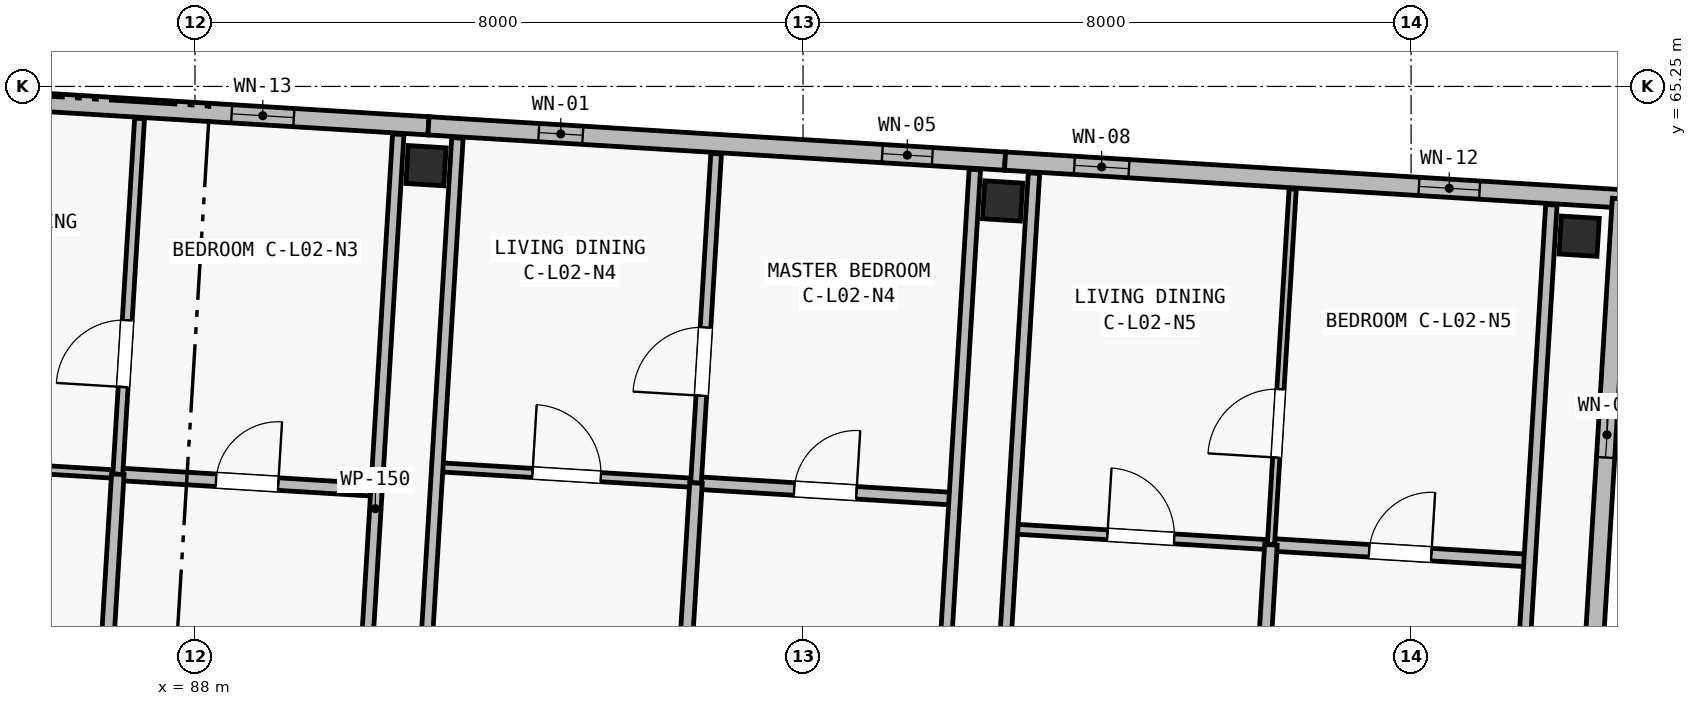
"""IFC4 building model, lengths in metres.
Left out: names, types, materials, properties, quantities, classifications, styles, units other than length and angle.
Written with IfcOpenShell. Run it as: python <this file> out.ifc"""

import sys

from ifc_helpers import new_model, si_unit, direction, frame, frame_2d, origin, origin_2d, place, context, subcontext, project, spatial, rectangle, extrude, element, fill, save


model = new_model("IFC4")
c1 = context("Model", 3, precision=1e-05, world=origin(), true_north=direction((0.0, 1.0)))
c2 = subcontext(c1, "Body", "Model", "MODEL_VIEW")
j1 = project(units=[si_unit("LENGTHUNIT", "METRE"), si_unit("PLANEANGLEUNIT", "RADIAN")], contexts=[c1])
p1 = place(None, origin())
s1 = spatial("IfcSite", under=j1, at=p1, CompositionType="ELEMENT")
p2 = place(p1, origin())
s2 = spatial("IfcBuilding", under=s1, at=p2, CompositionType="ELEMENT")
p3 = place(p2, frame((0.0, 0.0, 8.4)))
s3 = spatial("IfcBuildingStorey", under=s2, at=p3, CompositionType="ELEMENT", Elevation=8.4)
for number, where, z_axis, x_axis in (
    (1, (91.04, 64.208, 0.0), (0.0, 0.0, 1.0), (0.998, -0.061, 0.0)),
    (2, (98.626, 63.744, 0.0), (0.0, 0.0, 1.0), (0.998, -0.061, 0.0)),
    (3, (106.211, 63.28, 0.0), (0.0, 0.0, 1.0), (0.998, -0.061, 0.0)),
):
    element("IfcColumn", number, at=place(p3, frame(where, z_axis=z_axis, x_axis=x_axis)), inside=s3, PredefinedType="COLUMN", context=c2, shape_type="SweptSolid", body=[
        extrude(rectangle(XDim=0.5, YDim=0.5, at=origin_2d()), origin(), (0.0, 0.0, 1.0), 3.25),
    ])
p4 = place(p3, frame((83.486, 65.196, 0.0), z_axis=(0.0, 0.0, 1.0), x_axis=(0.998135669243, -0.061034300063, 0.0)))
e4 = element("IfcWall", 4, at=p4, inside=s3, PredefinedType="SOLIDWALL", context=c2, shape_type="SweptSolid", body=[
    extrude(rectangle(XDim=7.6, YDim=0.24, at=frame_2d((3.8, 0.0))), origin(), (0.0, 0.0, 1.0), 3.0),
])
p5 = place(p4, frame((1.807, 0.0, 0.5)))
e5 = element("IfcOpeningElement", 5, at=p5, cuts=e4, PredefinedType="OPENING", context=c2, shape_type="SweptSolid", body=[
    extrude(rectangle(XDim=0.74, YDim=2.26, at=frame_2d((0.37, 1.13))), frame((0.0, 0.135, 0.0), z_axis=(0.0, -1.0, 0.0), x_axis=(1.0, 0.0, 0.0)), (0.0, 0.0, 1.0), 0.27),
])
p6 = place(p4, frame((5.006, 0.0, 0.44)))
e6 = element("IfcOpeningElement", 6, at=p6, cuts=e4, PredefinedType="OPENING", context=c2, shape_type="SweptSolid", body=[
    extrude(rectangle(XDim=0.82, YDim=2.18, at=frame_2d((0.41, 1.09))), frame((0.0, 0.135, 0.0), z_axis=(0.0, -1.0, 0.0), x_axis=(1.0, 0.0, 0.0)), (0.0, 0.0, 1.0), 0.27),
])
p7 = place(p3, frame((91.072, 64.732, 0.0), z_axis=(0.0, 0.0, 1.0), x_axis=(0.998133591969, -0.061068261669, 0.0)))
e7 = element("IfcWall", 7, at=p7, inside=s3, PredefinedType="SOLIDWALL", context=c2, shape_type="SweptSolid", body=[
    extrude(rectangle(XDim=7.6, YDim=0.24, at=frame_2d((3.8, 0.0))), origin(), (0.0, 0.0, 1.0), 3.0),
])
p8 = place(p7, frame((1.454, 0.0, 0.44)))
e8 = element("IfcOpeningElement", 8, at=p8, cuts=e7, PredefinedType="OPENING", context=c2, shape_type="SweptSolid", body=[
    extrude(rectangle(XDim=0.58, YDim=2.16, at=frame_2d((0.29, 1.08))), frame((0.0, 0.135, 0.0), z_axis=(0.0, -1.0, 0.0), x_axis=(1.0, 0.0, 0.0)), (0.0, 0.0, 1.0), 0.27),
])
p9 = place(p7, frame((5.982, 0.0, 0.5)))
e9 = element("IfcOpeningElement", 9, at=p9, cuts=e7, PredefinedType="OPENING", context=c2, shape_type="SweptSolid", body=[
    extrude(rectangle(XDim=0.66, YDim=2.32, at=frame_2d((0.33, 1.16))), frame((0.0, 0.135, 0.0), z_axis=(0.0, -1.0, 0.0), x_axis=(1.0, 0.0, 0.0)), (0.0, 0.0, 1.0), 0.27),
])
p10 = place(p3, frame((98.658, 64.268, 0.0), z_axis=(0.0, 0.0, 1.0), x_axis=(0.998134248939, -0.061057522844, 0.0)))
e10 = element("IfcWall", 10, at=p10, inside=s3, PredefinedType="SOLIDWALL", context=c2, shape_type="SweptSolid", body=[
    extrude(rectangle(XDim=8.125, YDim=0.24, at=frame_2d((4.062, 0.0))), origin(), (0.0, 0.0, 1.0), 3.0),
])
p11 = place(p10, frame((0.914, 0.0, 0.5)))
e11 = element("IfcOpeningElement", 11, at=p11, cuts=e10, PredefinedType="OPENING", context=c2, shape_type="SweptSolid", body=[
    extrude(rectangle(XDim=0.72, YDim=2.16, at=frame_2d((0.36, 1.08))), frame((0.0, 0.135, 0.0), z_axis=(0.0, -1.0, 0.0), x_axis=(1.0, 0.0, 0.0)), (0.0, 0.0, 1.0), 0.27),
])
p12 = place(p10, frame((5.456, 0.0, 0.44)))
e12 = element("IfcOpeningElement", 12, at=p12, cuts=e10, PredefinedType="OPENING", context=c2, shape_type="SweptSolid", body=[
    extrude(rectangle(XDim=0.8, YDim=2.3, at=frame_2d((0.4, 1.15))), frame((0.0, 0.135, 0.0), z_axis=(0.0, -1.0, 0.0), x_axis=(1.0, 0.0, 0.0)), (0.0, 0.0, 1.0), 0.27),
])
p13 = place(p3, frame((106.768, 63.771, 0.0), z_axis=(0.0, 0.0, 1.0), x_axis=(-0.061053332998, -0.99813450523, 0.0)))
e13 = element("IfcWall", 13, at=p13, inside=s3, PredefinedType="SOLIDWALL", context=c2, shape_type="SweptSolid", body=[
    extrude(rectangle(XDim=20.65, YDim=0.24, at=frame_2d((10.325, 0.0))), origin(), (0.0, 0.0, 1.0), 3.0),
])
p14 = place(p13, frame((2.81, 0.0, 0.45)))
e14 = element("IfcOpeningElement", 14, at=p14, cuts=e13, PredefinedType="OPENING", context=c2, shape_type="SweptSolid", body=[
    extrude(rectangle(XDim=0.6, YDim=2.22, at=frame_2d((0.3, 1.11))), frame((0.0, 0.135, 0.0), z_axis=(0.0, -1.0, 0.0), x_axis=(1.0, 0.0, 0.0)), (0.0, 0.0, 1.0), 0.27),
])
p15 = place(p13, frame((17.1, 0.0, 0.52)))
e15 = element("IfcOpeningElement", 15, at=p15, cuts=e13, PredefinedType="OPENING", context=c2, shape_type="SweptSolid", body=[
    extrude(rectangle(XDim=0.74, YDim=2.26, at=frame_2d((0.37, 1.13))), frame((0.0, 0.135, 0.0), z_axis=(0.0, -1.0, 0.0), x_axis=(1.0, 0.0, 0.0)), (0.0, 0.0, 1.0), 0.27),
])
p16 = place(p3, frame((83.581, 60.356, 0.0), z_axis=(0.0, 0.0, 1.0), x_axis=(0.998133350094, -0.061072214879, 0.0)))
e16 = element("IfcWall", 16, at=p16, inside=s3, PredefinedType="PARTITIONING", context=c2, shape_type="SweptSolid", body=[
    extrude(rectangle(XDim=3.41, YDim=0.11, at=frame_2d((1.705, 0.0))), origin(), (0.0, 0.0, 1.0), 2.97),
])
p17 = place(p16, frame((1.255, 0.0, 0.0)))
e17 = element("IfcOpeningElement", 17, at=p17, cuts=e16, PredefinedType="OPENING", context=c2, shape_type="SweptSolid", body=[
    extrude(rectangle(XDim=0.9, YDim=2.1, at=frame_2d((0.45, 1.05))), frame((0.0, 0.07, 0.0), z_axis=(0.0, -1.0, 0.0), x_axis=(1.0, 0.0, 0.0)), (0.0, 0.0, 1.0), 0.14),
])
p18 = place(p3, frame((86.984, 60.147, 0.0), z_axis=(0.0, 0.0, 1.0), x_axis=(0.99813797838, -0.060996525433, 0.0)))
e18 = element("IfcWall", 18, at=p18, inside=s3, PredefinedType="PLUMBINGWALL", context=c2, shape_type="SweptSolid", body=[
    extrude(rectangle(XDim=3.41, YDim=0.165, at=frame_2d((1.705, 0.0))), origin(), (0.0, 0.0, 1.0), 2.97),
])
p19 = place(p18, frame((1.295, 0.0, 0.0)))
e19 = element("IfcOpeningElement", 19, at=p19, cuts=e18, PredefinedType="OPENING", context=c2, shape_type="SweptSolid", body=[
    extrude(rectangle(XDim=0.82, YDim=2.08, at=frame_2d((0.41, 1.04))), frame((0.0, 0.097, 0.0), z_axis=(0.0, -1.0, 0.0), x_axis=(1.0, 0.0, 0.0)), (0.0, 0.0, 1.0), 0.195),
])
p20 = place(p3, frame((86.984, 60.147, 0.0), z_axis=(0.0, 0.0, 1.0), x_axis=(0.061059262019, 0.998134142549, 0.0)))
e20 = element("IfcWall", 20, at=p20, inside=s3, PredefinedType="PARTITIONING", context=c2, shape_type="SweptSolid", body=[
    extrude(rectangle(XDim=4.69, YDim=0.13, at=frame_2d((2.345, 0.0))), origin(), (0.0, 0.0, 1.0), 2.97),
])
p21 = place(p20, frame((1.15, 0.0, 0.0)))
e21 = element("IfcOpeningElement", 21, at=p21, cuts=e20, PredefinedType="OPENING", context=c2, shape_type="SweptSolid", body=[
    extrude(rectangle(XDim=0.88, YDim=2.1, at=frame_2d((0.44, 1.05))), frame((0.0, 0.08, 0.0), z_axis=(0.0, -1.0, 0.0), x_axis=(1.0, 0.0, 0.0)), (0.0, 0.0, 1.0), 0.16),
])
p22 = place(p3, frame((86.668, 54.977, 0.0), z_axis=(0.0, 0.0, 1.0), x_axis=(0.061037231879, 0.998135489963, 0.0)))
e22 = element("IfcWall", 22, at=p22, inside=s3, PredefinedType="PLUMBINGWALL", context=c2, shape_type="SweptSolid", body=[
    extrude(rectangle(XDim=5.18, YDim=0.165, at=frame_2d((2.59, 0.0))), origin(), (0.0, 0.0, 1.0), 2.97),
])
p23 = place(p3, frame((90.072, 54.769, 0.0), z_axis=(0.0, 0.0, 1.0), x_axis=(0.061047700465, 0.998134849741, 0.0)))
e23 = element("IfcWall", 23, at=p23, inside=s3, PredefinedType="PARTITIONING", context=c2, shape_type="SweptSolid", body=[
    extrude(rectangle(XDim=9.87, YDim=0.15, at=frame_2d((4.935, 0.0))), origin(), (0.0, 0.0, 1.0), 2.97),
])
p24 = place(p3, frame((91.188, 60.241, 0.0), z_axis=(0.0, 0.0, 1.0), x_axis=(0.998133350094, -0.061072214879, 0.0)))
e24 = element("IfcWall", 24, at=p24, inside=s3, PredefinedType="PARTITIONING", context=c2, shape_type="SweptSolid", body=[
    extrude(rectangle(XDim=3.41, YDim=0.12, at=frame_2d((1.705, 0.0))), origin(), (0.0, 0.0, 1.0), 2.97),
])
p25 = place(p24, frame((1.255, 0.0, 0.0)))
e25 = element("IfcOpeningElement", 25, at=p25, cuts=e24, PredefinedType="OPENING", context=c2, shape_type="SweptSolid", body=[
    extrude(rectangle(XDim=0.9, YDim=2.1, at=frame_2d((0.45, 1.05))), frame((0.0, 0.075, 0.0), z_axis=(0.0, -1.0, 0.0), x_axis=(1.0, 0.0, 0.0)), (0.0, 0.0, 1.0), 0.15),
])
p26 = place(p3, frame((94.592, 60.033, 0.0), z_axis=(0.0, 0.0, 1.0), x_axis=(0.998133617109, -0.061067850767, 0.0)))
e26 = element("IfcWall", 26, at=p26, inside=s3, PredefinedType="PLUMBINGWALL", context=c2, shape_type="SweptSolid", body=[
    extrude(rectangle(XDim=3.41, YDim=0.165, at=frame_2d((1.705, 0.0))), origin(), (0.0, 0.0, 1.0), 2.97),
])
p27 = place(p26, frame((1.295, 0.0, 0.0)))
e27 = element("IfcOpeningElement", 27, at=p27, cuts=e26, PredefinedType="OPENING", context=c2, shape_type="SweptSolid", body=[
    extrude(rectangle(XDim=0.82, YDim=2.08, at=frame_2d((0.41, 1.04))), frame((0.0, 0.097, 0.0), z_axis=(0.0, -1.0, 0.0), x_axis=(1.0, 0.0, 0.0)), (0.0, 0.0, 1.0), 0.195),
])
p28 = place(p3, frame((94.592, 60.033, 0.0), z_axis=(0.0, 0.0, 1.0), x_axis=(0.061092906669, 0.998132083822, 0.0)))
e28 = element("IfcWall", 28, at=p28, inside=s3, PredefinedType="PARTITIONING", context=c2, shape_type="SweptSolid", body=[
    extrude(rectangle(XDim=4.34, YDim=0.14, at=frame_2d((2.17, 0.0))), origin(), (0.0, 0.0, 1.0), 2.97),
])
p29 = place(p28, frame((1.15, 0.0, 0.0)))
e29 = element("IfcOpeningElement", 29, at=p29, cuts=e28, PredefinedType="OPENING", context=c2, shape_type="SweptSolid", body=[
    extrude(rectangle(XDim=0.9, YDim=2.1, at=frame_2d((0.45, 1.05))), frame((0.0, 0.085, 0.0), z_axis=(0.0, -1.0, 0.0), x_axis=(1.0, 0.0, 0.0)), (0.0, 0.0, 1.0), 0.17),
])
p30 = place(p3, frame((94.254, 54.513, 0.0), z_axis=(0.0, 0.0, 1.0), x_axis=(0.061056206715, 0.998134329447, 0.0)))
e30 = element("IfcWall", 30, at=p30, inside=s3, PredefinedType="PLUMBINGWALL", context=c2, shape_type="SweptSolid", body=[
    extrude(rectangle(XDim=5.53, YDim=0.165, at=frame_2d((2.765, 0.0))), origin(), (0.0, 0.0, 1.0), 2.97),
])
for number, where, z_axis, x_axis in (
    (31, (90.85, 54.721, 0.0), (0.0, 0.0, 1.0), (0.061, 0.998, 0.0)),
    (32, (97.658, 54.305, 0.0), (0.0, 0.0, 1.0), (0.061, 0.998, 0.0)),
):
    element("IfcWall", number, at=place(p3, frame(where, z_axis=z_axis, x_axis=x_axis)), inside=s3, PredefinedType="PARTITIONING", context=c2, shape_type="SweptSolid", body=[
        extrude(rectangle(XDim=9.87, YDim=0.15, at=frame_2d((4.935, 0.0))), origin(), (0.0, 0.0, 1.0), 2.97),
    ])
p31 = place(p3, frame((98.752, 59.428, 0.0), z_axis=(0.0, 0.0, 1.0), x_axis=(0.998137711988, -0.061000884486, 0.0)))
e33 = element("IfcWall", 33, at=p31, inside=s3, PredefinedType="PARTITIONING", context=c2, shape_type="SweptSolid", body=[
    extrude(rectangle(XDim=3.41, YDim=0.13, at=frame_2d((1.705, 0.0))), origin(), (0.0, 0.0, 1.0), 2.97),
])
p32 = place(p31, frame((1.255, 0.0, 0.0)))
e34 = element("IfcOpeningElement", 34, at=p32, cuts=e33, PredefinedType="OPENING", context=c2, shape_type="SweptSolid", body=[
    extrude(rectangle(XDim=0.88, YDim=2.1, at=frame_2d((0.44, 1.05))), frame((0.0, 0.08, 0.0), z_axis=(0.0, -1.0, 0.0), x_axis=(1.0, 0.0, 0.0)), (0.0, 0.0, 1.0), 0.16),
])
p33 = place(p3, frame((102.156, 59.22, 0.0), z_axis=(0.0, 0.0, 1.0), x_axis=(0.998133617109, -0.061067850767, 0.0)))
e35 = element("IfcWall", 35, at=p33, inside=s3, PredefinedType="PLUMBINGWALL", context=c2, shape_type="SweptSolid", body=[
    extrude(rectangle(XDim=3.41, YDim=0.165, at=frame_2d((1.705, 0.0))), origin(), (0.0, 0.0, 1.0), 2.97),
])
p34 = place(p33, frame((1.295, 0.0, 0.0)))
e36 = element("IfcOpeningElement", 36, at=p34, cuts=e35, PredefinedType="OPENING", context=c2, shape_type="SweptSolid", body=[
    extrude(rectangle(XDim=0.82, YDim=2.08, at=frame_2d((0.41, 1.04))), frame((0.0, 0.097, 0.0), z_axis=(0.0, -1.0, 0.0), x_axis=(1.0, 0.0, 0.0)), (0.0, 0.0, 1.0), 0.195),
])
p35 = place(p3, frame((102.156, 59.22, 0.0), z_axis=(0.0, 0.0, 1.0), x_axis=(0.061062434628, 0.998133948465, 0.0)))
e37 = element("IfcWall", 37, at=p35, inside=s3, PredefinedType="PARTITIONING", context=c2, shape_type="SweptSolid", body=[
    extrude(rectangle(XDim=4.69, YDim=0.095, at=frame_2d((2.345, 0.0))), origin(), (0.0, 0.0, 1.0), 2.97),
])
p36 = place(p35, frame((1.15, 0.0, 0.0)))
e38 = element("IfcOpeningElement", 38, at=p36, cuts=e37, PredefinedType="OPENING", context=c2, shape_type="SweptSolid", body=[
    extrude(rectangle(XDim=0.9, YDim=2.1, at=frame_2d((0.45, 1.05))), frame((0.0, 0.062, 0.0), z_axis=(0.0, -1.0, 0.0), x_axis=(1.0, 0.0, 0.0)), (0.0, 0.0, 1.0), 0.125),
])
p37 = place(p3, frame((101.84, 54.049, 0.0), z_axis=(0.0, 0.0, 1.0), x_axis=(0.06103436051, 0.998135665547, 0.0)))
e39 = element("IfcWall", 39, at=p37, inside=s3, PredefinedType="PLUMBINGWALL", context=c2, shape_type="SweptSolid", body=[
    extrude(rectangle(XDim=5.18, YDim=0.165, at=frame_2d((2.59, 0.0))), origin(), (0.0, 0.0, 1.0), 2.97),
])
for number, where, z_axis, x_axis in (
    (40, (98.436, 54.258, 0.0), (0.0, 0.0, 1.0), (0.061, 0.998, 0.0)),
    (41, (105.243, 53.841, 0.0), (0.0, 0.0, 1.0), (0.061, 0.998, 0.0)),
):
    element("IfcWall", number, at=place(p3, frame(where, z_axis=z_axis, x_axis=x_axis)), inside=s3, PredefinedType="PARTITIONING", context=c2, shape_type="SweptSolid", body=[
        extrude(rectangle(XDim=9.87, YDim=0.15, at=frame_2d((4.935, 0.0))), origin(), (0.0, 0.0, 1.0), 2.97),
    ])
p38 = place(p6, origin())
e42 = element("IfcWindow", 42, at=p38, inside=s3, PartitioningType="SINGLE_PANEL", PredefinedType="WINDOW", context=c2, shape_type="SweptSolid", body=[
    extrude(rectangle(XDim=0.82, YDim=2.18, at=frame_2d((0.41, 1.09))), frame((0.0, 0.03, 0.0), z_axis=(0.0, -1.0, 0.0), x_axis=(1.0, 0.0, 0.0)), (0.0, 0.0, 1.0), 0.06),
])
fill(e6, e42)
p39 = place(p8, origin())
e43 = element("IfcWindow", 43, at=p39, inside=s3, PartitioningType="SINGLE_PANEL", PredefinedType="WINDOW", context=c2, shape_type="SweptSolid", body=[
    extrude(rectangle(XDim=0.58, YDim=2.16, at=frame_2d((0.29, 1.08))), frame((0.0, 0.03, 0.0), z_axis=(0.0, -1.0, 0.0), x_axis=(1.0, 0.0, 0.0)), (0.0, 0.0, 1.0), 0.06),
])
fill(e8, e43)
p40 = place(p9, origin())
e44 = element("IfcWindow", 44, at=p40, inside=s3, PartitioningType="SINGLE_PANEL", PredefinedType="WINDOW", context=c2, shape_type="SweptSolid", body=[
    extrude(rectangle(XDim=0.66, YDim=2.32, at=frame_2d((0.33, 1.16))), frame((0.0, 0.03, 0.0), z_axis=(0.0, -1.0, 0.0), x_axis=(1.0, 0.0, 0.0)), (0.0, 0.0, 1.0), 0.06),
])
fill(e9, e44)
p41 = place(p11, origin())
e45 = element("IfcWindow", 45, at=p41, inside=s3, PartitioningType="SINGLE_PANEL", PredefinedType="WINDOW", context=c2, shape_type="SweptSolid", body=[
    extrude(rectangle(XDim=0.72, YDim=2.16, at=frame_2d((0.36, 1.08))), frame((0.0, 0.03, 0.0), z_axis=(0.0, -1.0, 0.0), x_axis=(1.0, 0.0, 0.0)), (0.0, 0.0, 1.0), 0.06),
])
fill(e11, e45)
p42 = place(p12, origin())
e46 = element("IfcWindow", 46, at=p42, inside=s3, PartitioningType="SINGLE_PANEL", PredefinedType="WINDOW", context=c2, shape_type="SweptSolid", body=[
    extrude(rectangle(XDim=0.8, YDim=2.3, at=frame_2d((0.4, 1.15))), frame((0.0, 0.03, 0.0), z_axis=(0.0, -1.0, 0.0), x_axis=(1.0, 0.0, 0.0)), (0.0, 0.0, 1.0), 0.06),
])
fill(e12, e46)
p43 = place(p14, origin())
e47 = element("IfcWindow", 47, at=p43, inside=s3, PartitioningType="SINGLE_PANEL", PredefinedType="WINDOW", context=c2, shape_type="SweptSolid", body=[
    extrude(rectangle(XDim=0.6, YDim=2.22, at=frame_2d((0.3, 1.11))), frame((0.0, 0.03, 0.0), z_axis=(0.0, -1.0, 0.0), x_axis=(1.0, 0.0, 0.0)), (0.0, 0.0, 1.0), 0.06),
])
fill(e14, e47)
p44 = place(p19, origin())
e48 = element("IfcDoor", 48, at=p44, inside=s3, OperationType="SINGLE_SWING_RIGHT", PredefinedType="DOOR", context=c2, shape_type="SweptSolid", body=[
    extrude(rectangle(XDim=0.82, YDim=2.08, at=frame_2d((0.41, 1.04))), frame((0.0, 0.025, 0.0), z_axis=(0.0, -1.0, 0.0), x_axis=(1.0, 0.0, 0.0)), (0.0, 0.0, 1.0), 0.05),
])
fill(e19, e48)
p45 = place(p21, origin())
e49 = element("IfcDoor", 49, at=p45, inside=s3, OperationType="SINGLE_SWING_LEFT", PredefinedType="DOOR", context=c2, shape_type="SweptSolid", body=[
    extrude(rectangle(XDim=0.88, YDim=2.1, at=frame_2d((0.44, 1.05))), frame((0.0, 0.025, 0.0), z_axis=(0.0, -1.0, 0.0), x_axis=(1.0, 0.0, 0.0)), (0.0, 0.0, 1.0), 0.05),
])
fill(e21, e49)
p46 = place(p25, origin())
e50 = element("IfcDoor", 50, at=p46, inside=s3, OperationType="SINGLE_SWING_LEFT", PredefinedType="DOOR", context=c2, shape_type="SweptSolid", body=[
    extrude(rectangle(XDim=0.9, YDim=2.1, at=frame_2d((0.45, 1.05))), frame((0.0, 0.025, 0.0), z_axis=(0.0, -1.0, 0.0), x_axis=(1.0, 0.0, 0.0)), (0.0, 0.0, 1.0), 0.05),
])
fill(e25, e50)
p47 = place(p27, origin())
e51 = element("IfcDoor", 51, at=p47, inside=s3, OperationType="SINGLE_SWING_RIGHT", PredefinedType="DOOR", context=c2, shape_type="SweptSolid", body=[
    extrude(rectangle(XDim=0.82, YDim=2.08, at=frame_2d((0.41, 1.04))), frame((0.0, 0.025, 0.0), z_axis=(0.0, -1.0, 0.0), x_axis=(1.0, 0.0, 0.0)), (0.0, 0.0, 1.0), 0.05),
])
fill(e27, e51)
p48 = place(p29, origin())
e52 = element("IfcDoor", 52, at=p48, inside=s3, OperationType="SINGLE_SWING_LEFT", PredefinedType="DOOR", context=c2, shape_type="SweptSolid", body=[
    extrude(rectangle(XDim=0.9, YDim=2.1, at=frame_2d((0.45, 1.05))), frame((0.0, 0.025, 0.0), z_axis=(0.0, -1.0, 0.0), x_axis=(1.0, 0.0, 0.0)), (0.0, 0.0, 1.0), 0.05),
])
fill(e29, e52)
p49 = place(p32, origin())
e53 = element("IfcDoor", 53, at=p49, inside=s3, OperationType="SINGLE_SWING_LEFT", PredefinedType="DOOR", context=c2, shape_type="SweptSolid", body=[
    extrude(rectangle(XDim=0.88, YDim=2.1, at=frame_2d((0.44, 1.05))), frame((0.0, 0.025, 0.0), z_axis=(0.0, -1.0, 0.0), x_axis=(1.0, 0.0, 0.0)), (0.0, 0.0, 1.0), 0.05),
])
fill(e34, e53)
p50 = place(p34, origin())
e54 = element("IfcDoor", 54, at=p50, inside=s3, OperationType="SINGLE_SWING_RIGHT", PredefinedType="DOOR", context=c2, shape_type="SweptSolid", body=[
    extrude(rectangle(XDim=0.82, YDim=2.08, at=frame_2d((0.41, 1.04))), frame((0.0, 0.025, 0.0), z_axis=(0.0, -1.0, 0.0), x_axis=(1.0, 0.0, 0.0)), (0.0, 0.0, 1.0), 0.05),
])
fill(e36, e54)
p51 = place(p36, origin())
e55 = element("IfcDoor", 55, at=p51, inside=s3, OperationType="SINGLE_SWING_LEFT", PredefinedType="DOOR", context=c2, shape_type="SweptSolid", body=[
    extrude(rectangle(XDim=0.9, YDim=2.1, at=frame_2d((0.45, 1.05))), frame((0.0, 0.025, 0.0), z_axis=(0.0, -1.0, 0.0), x_axis=(1.0, 0.0, 0.0)), (0.0, 0.0, 1.0), 0.05),
])
fill(e38, e55)
save(model, sys.argv[1])
